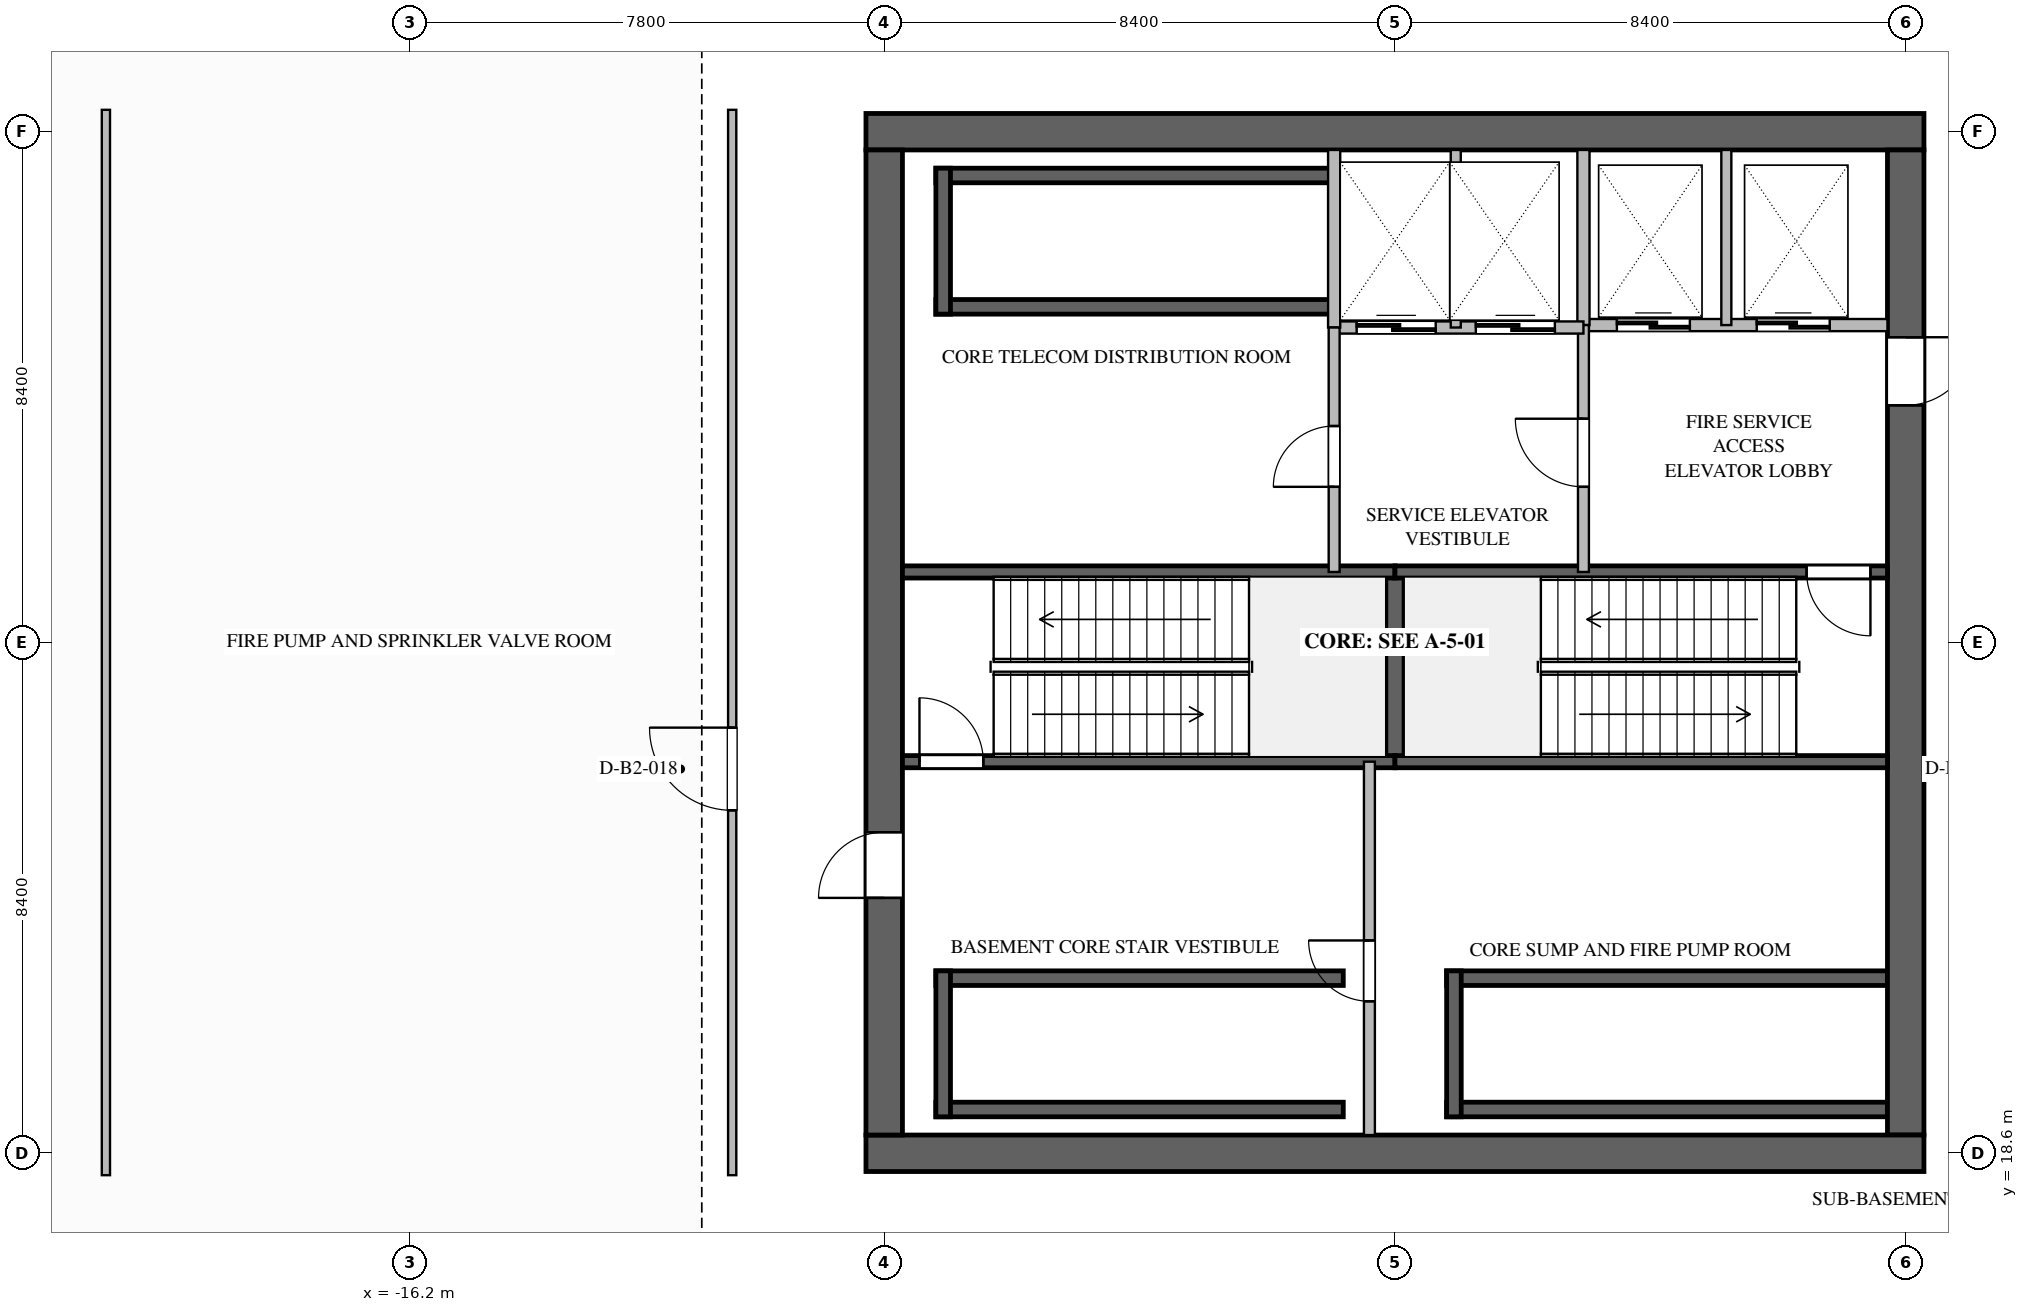
"""IFC4 building model, lengths in metres.
Left out: names, types, materials, properties, quantities, classifications, styles, units other than length and angle.
Written with IfcOpenShell. Run it as: python <this file> out.ifc"""

import sys

from ifc_helpers import new_model, si_unit, direction, frame, frame_2d, origin, place, context, subcontext, project, spatial, rectangle, extrude, element, fill, save


model = new_model("IFC4")
c1 = context("Model", 3, precision=1e-05, world=origin(), true_north=direction((0.0, 1.0)))
c2 = subcontext(c1, "Body", "Model", "MODEL_VIEW")
j1 = project(units=[si_unit("LENGTHUNIT", "METRE"), si_unit("PLANEANGLEUNIT", "RADIAN")], contexts=[c1])
p1 = place(None, origin())
s1 = spatial("IfcSite", under=j1, at=p1, CompositionType="ELEMENT")
p2 = place(p1, origin())
s2 = spatial("IfcBuilding", under=s1, at=p2, CompositionType="ELEMENT")
p3 = place(p2, frame((0.0, 0.0, -10.8)))
s3 = spatial("IfcBuildingStorey", under=s2, at=p3, CompositionType="ELEMENT", Elevation=-10.8)
for number, where, z_axis, x_axis in (
    (1, (-7.55, 19.32, 0.0), (0.0, 0.0, 1.0), (1.0, 0.0, 0.0)),
    (2, (-7.55, 21.48, 0.0), (0.0, 0.0, 1.0), (1.0, 0.0, 0.0)),
):
    element("IfcWall", number, at=place(p3, frame(where, z_axis=z_axis, x_axis=x_axis)), inside=s3, PredefinedType="USERDEFINED", context=c2, shape_type="SweptSolid", body=[
        extrude(rectangle(XDim=6.7, YDim=0.24, at=frame_2d((3.35, 0.0))), origin(), (0.0, 0.0, 1.0), 3.92),
    ])
p4 = place(p3, frame((-7.43, 19.2, 0.0), z_axis=(0.0, 0.0, 1.0), x_axis=(0.0, 1.0, 0.0)))
e3 = element("IfcWall", 3, at=p4, inside=s3, PredefinedType="USERDEFINED", context=c2, shape_type="SweptSolid", body=[
    extrude(rectangle(XDim=2.4, YDim=0.24, at=frame_2d((1.2, 0.0))), origin(), (0.0, 0.0, 1.0), 3.92),
])
for number, where, z_axis, x_axis in (
    (4, (0.85, 19.32, 0.0), (0.0, 0.0, 1.0), (1.0, 0.0, 0.0)),
    (5, (0.85, 21.48, 0.0), (0.0, 0.0, 1.0), (1.0, 0.0, 0.0)),
):
    element("IfcWall", number, at=place(p3, frame(where, z_axis=z_axis, x_axis=x_axis)), inside=s3, PredefinedType="USERDEFINED", context=c2, shape_type="SweptSolid", body=[
        extrude(rectangle(XDim=7.25, YDim=0.24, at=frame_2d((3.625, 0.0))), origin(), (0.0, 0.0, 1.0), 3.92),
    ])
p5 = place(p3, frame((0.97, 19.2, 0.0), z_axis=(0.0, 0.0, 1.0), x_axis=(0.0, 1.0, 0.0)))
e6 = element("IfcWall", 6, at=p5, inside=s3, PredefinedType="USERDEFINED", context=c2, shape_type="SweptSolid", body=[
    extrude(rectangle(XDim=2.4, YDim=0.24, at=frame_2d((1.2, 0.0))), origin(), (0.0, 0.0, 1.0), 3.92),
])
for number, where, z_axis, x_axis in (
    (7, (-7.55, 32.52, 0.0), (0.0, 0.0, 1.0), (1.0, 0.0, 0.0)),
    (8, (-7.55, 34.68, 0.0), (0.0, 0.0, 1.0), (1.0, 0.0, 0.0)),
):
    element("IfcWall", number, at=place(p3, frame(where, z_axis=z_axis, x_axis=x_axis)), inside=s3, PredefinedType="USERDEFINED", context=c2, shape_type="SweptSolid", body=[
        extrude(rectangle(XDim=6.5, YDim=0.24, at=frame_2d((3.25, 0.0))), origin(), (0.0, 0.0, 1.0), 3.92),
    ])
p6 = place(p3, frame((-7.43, 32.4, 0.0), z_axis=(0.0, 0.0, 1.0), x_axis=(0.0, 1.0, 0.0)))
e9 = element("IfcWall", 9, at=p6, inside=s3, PredefinedType="USERDEFINED", context=c2, shape_type="SweptSolid", body=[
    extrude(rectangle(XDim=2.4, YDim=0.24, at=frame_2d((1.2, 0.0))), origin(), (0.0, 0.0, 1.0), 3.92),
])
p7 = place(p3, frame((-8.7, 35.4, 0.0), z_axis=(0.0, 0.0, 1.0), x_axis=(1.0, 0.0, 0.0)))
e10 = element("IfcWall", 10, at=p7, inside=s3, PredefinedType="SHEAR", context=c2, shape_type="SweptSolid", body=[
    extrude(rectangle(XDim=17.4, YDim=0.6, at=frame_2d((8.7, 0.0))), origin(), (0.0, 0.0, 1.0), 5.4),
])
p8 = place(p3, frame((8.4, 35.1, 0.0), z_axis=(0.0, 0.0, 1.0), x_axis=(0.0, -1.0, 0.0)))
e11 = element("IfcWall", 11, at=p8, inside=s3, PredefinedType="SHEAR", context=c2, shape_type="SweptSolid", body=[
    extrude(rectangle(XDim=16.2, YDim=0.6, at=frame_2d((8.1, 0.0))), origin(), (0.0, 0.0, 1.0), 5.4),
])
p9 = place(p8, frame((3.08, 0.0, 0.0)))
e12 = element("IfcOpeningElement", 12, at=p9, cuts=e11, PredefinedType="OPENING", context=c2, shape_type="SweptSolid", body=[
    extrude(rectangle(XDim=1.12, YDim=2.1, at=frame_2d((0.56, 1.05))), frame((0.0, 0.31, 0.0), z_axis=(0.0, -1.0, 0.0), x_axis=(1.0, 0.0, 0.0)), (0.0, 0.0, 1.0), 0.62),
])
p10 = place(p3, frame((8.7, 18.6, 0.0), z_axis=(0.0, 0.0, 1.0), x_axis=(-1.0, 0.0, 0.0)))
e13 = element("IfcWall", 13, at=p10, inside=s3, PredefinedType="SHEAR", context=c2, shape_type="SweptSolid", body=[
    extrude(rectangle(XDim=17.4, YDim=0.6, at=frame_2d((8.7, 0.0))), origin(), (0.0, 0.0, 1.0), 5.4),
])
p11 = place(p3, frame((-8.4, 18.9, 0.0), z_axis=(0.0, 0.0, 1.0), x_axis=(0.0, 1.0, 0.0)))
e14 = element("IfcWall", 14, at=p11, inside=s3, PredefinedType="SHEAR", context=c2, shape_type="SweptSolid", body=[
    extrude(rectangle(XDim=16.2, YDim=0.6, at=frame_2d((8.1, 0.0))), origin(), (0.0, 0.0, 1.0), 5.4),
])
p12 = place(p11, frame((3.9, 0.0, 0.0)))
e15 = element("IfcOpeningElement", 15, at=p12, cuts=e14, PredefinedType="OPENING", context=c2, shape_type="SweptSolid", body=[
    extrude(rectangle(XDim=1.08, YDim=2.04, at=frame_2d((0.54, 1.02))), frame((0.0, 0.31, 0.0), z_axis=(0.0, -1.0, 0.0), x_axis=(1.0, 0.0, 0.0)), (0.0, 0.0, 1.0), 0.62),
])
p13 = place(p3, frame((0.0, 25.04, 0.0), z_axis=(0.0, 0.0, 1.0), x_axis=(0.0, 1.0, 0.0)))
e16 = element("IfcWall", 16, at=p13, inside=s3, PredefinedType="SOLIDWALL", context=c2, shape_type="SweptSolid", body=[
    extrude(rectangle(XDim=3.12, YDim=0.3, at=frame_2d((1.56, 0.0))), origin(), (0.0, 0.0, 1.0), 5.05),
])
p14 = place(p3, frame((-8.1, 25.04, 0.0), z_axis=(0.0, 0.0, 1.0), x_axis=(1.0, 0.0, 0.0)))
e17 = element("IfcWall", 17, at=p14, inside=s3, PredefinedType="SOLIDWALL", context=c2, shape_type="SweptSolid", body=[
    extrude(rectangle(XDim=8.1, YDim=0.2, at=frame_2d((4.05, 0.0))), origin(), (0.0, 0.0, 1.0), 5.05),
])
p15 = place(p14, frame((0.28, 0.0, 0.0)))
e18 = element("IfcOpeningElement", 18, at=p15, cuts=e17, PredefinedType="OPENING", context=c2, shape_type="SweptSolid", body=[
    extrude(rectangle(XDim=1.05, YDim=2.1, at=frame_2d((0.525, 1.05))), frame((0.0, 0.11, 0.0), z_axis=(0.0, -1.0, 0.0), x_axis=(1.0, 0.0, 0.0)), (0.0, 0.0, 1.0), 0.22),
])
for number, where, z_axis, x_axis in (
    (19, (-8.1, 28.16, 0.0), (0.0, 0.0, 1.0), (1.0, 0.0, 0.0)),
    (20, (0.0, 25.04, 0.0), (0.0, 0.0, 1.0), (1.0, 0.0, 0.0)),
):
    element("IfcWall", number, at=place(p3, frame(where, z_axis=z_axis, x_axis=x_axis)), inside=s3, PredefinedType="SOLIDWALL", context=c2, shape_type="SweptSolid", body=[
        extrude(rectangle(XDim=8.1, YDim=0.2, at=frame_2d((4.05, 0.0))), origin(), (0.0, 0.0, 1.0), 5.05),
    ])
p16 = place(p3, frame((8.1, 28.16, 0.0), z_axis=(0.0, 0.0, 1.0), x_axis=(-1.0, 0.0, 0.0)))
e21 = element("IfcWall", 21, at=p16, inside=s3, PredefinedType="SOLIDWALL", context=c2, shape_type="SweptSolid", body=[
    extrude(rectangle(XDim=8.1, YDim=0.2, at=frame_2d((4.05, 0.0))), origin(), (0.0, 0.0, 1.0), 5.05),
])
p17 = place(p16, frame((0.28, 0.0, 0.0)))
e22 = element("IfcOpeningElement", 22, at=p17, cuts=e21, PredefinedType="OPENING", context=c2, shape_type="SweptSolid", body=[
    extrude(rectangle(XDim=1.05, YDim=2.1, at=frame_2d((0.525, 1.05))), frame((0.0, 0.11, 0.0), z_axis=(0.0, -1.0, 0.0), x_axis=(1.0, 0.0, 0.0)), (0.0, 0.0, 1.0), 0.22),
])
p18 = place(p3, frame((3.1, 32.22, 0.0), z_axis=(0.0, 0.0, 1.0), x_axis=(1.0, 0.0, 0.0)))
e23 = element("IfcWall", 23, at=p18, inside=s3, PredefinedType="SOLIDWALL", context=c2, shape_type="SweptSolid", body=[
    extrude(rectangle(XDim=5.0, YDim=0.2, at=frame_2d((2.5, 0.0))), origin(), (0.0, 0.0, 1.0), 5.05),
])
p19 = place(p18, frame((0.55, 0.0, 0.0)))
e24 = element("IfcOpeningElement", 24, at=p19, cuts=e23, PredefinedType="OPENING", context=c2, shape_type="SweptSolid", body=[
    extrude(rectangle(XDim=1.2, YDim=2.2, at=frame_2d((0.6, 1.1))), frame((0.0, 0.11, 0.0), z_axis=(0.0, -1.0, 0.0), x_axis=(1.0, 0.0, 0.0)), (0.0, 0.0, 1.0), 0.22),
])
p20 = place(p18, frame((2.85, 0.0, 0.0)))
e25 = element("IfcOpeningElement", 25, at=p20, cuts=e23, PredefinedType="OPENING", context=c2, shape_type="SweptSolid", body=[
    extrude(rectangle(XDim=1.2, YDim=2.2, at=frame_2d((0.6, 1.1))), frame((0.0, 0.11, 0.0), z_axis=(0.0, -1.0, 0.0), x_axis=(1.0, 0.0, 0.0)), (0.0, 0.0, 1.0), 0.22),
])
p21 = place(p3, frame((3.1, 32.22, 0.0), z_axis=(0.0, 0.0, 1.0), x_axis=(0.0, 1.0, 0.0)))
e26 = element("IfcWall", 26, at=p21, inside=s3, PredefinedType="SOLIDWALL", context=c2, shape_type="SweptSolid", body=[
    extrude(rectangle(XDim=2.88, YDim=0.2, at=frame_2d((1.44, 0.0))), origin(), (0.0, 0.0, 1.0), 5.05),
])
p22 = place(p3, frame((5.45, 32.22, 0.0), z_axis=(0.0, 0.0, 1.0), x_axis=(0.0, 1.0, 0.0)))
e27 = element("IfcWall", 27, at=p22, inside=s3, PredefinedType="PARTITIONING", context=c2, shape_type="SweptSolid", body=[
    extrude(rectangle(XDim=2.88, YDim=0.165, at=frame_2d((1.44, 0.0))), origin(), (0.0, 0.0, 1.0), 5.05),
])
p23 = place(p3, frame((3.1, 28.16, 0.0), z_axis=(0.0, 0.0, 1.0), x_axis=(0.0, 1.0, 0.0)))
e28 = element("IfcWall", 28, at=p23, inside=s3, PredefinedType="SOLIDWALL", context=c2, shape_type="SweptSolid", body=[
    extrude(rectangle(XDim=4.06, YDim=0.18, at=frame_2d((2.03, 0.0))), origin(), (0.0, 0.0, 1.0), 5.05),
])
p24 = place(p23, frame((1.4, 0.0, 0.0)))
e29 = element("IfcOpeningElement", 29, at=p24, cuts=e28, PredefinedType="OPENING", context=c2, shape_type="SweptSolid", body=[
    extrude(rectangle(XDim=1.12, YDim=2.1, at=frame_2d((0.56, 1.05))), frame((0.0, 0.1, 0.0), z_axis=(0.0, -1.0, 0.0), x_axis=(1.0, 0.0, 0.0)), (0.0, 0.0, 1.0), 0.2),
])
p25 = place(p3, frame((-1.0, 32.18, 0.0), z_axis=(0.0, 0.0, 1.0), x_axis=(1.0, 0.0, 0.0)))
e30 = element("IfcWall", 30, at=p25, inside=s3, PredefinedType="SOLIDWALL", context=c2, shape_type="SweptSolid", body=[
    extrude(rectangle(XDim=4.1, YDim=0.2, at=frame_2d((2.05, 0.0))), origin(), (0.0, 0.0, 1.0), 5.05),
])
p26 = place(p25, frame((0.37, 0.0, 0.0)))
e31 = element("IfcOpeningElement", 31, at=p26, cuts=e30, PredefinedType="OPENING", context=c2, shape_type="SweptSolid", body=[
    extrude(rectangle(XDim=1.3, YDim=2.2, at=frame_2d((0.65, 1.1))), frame((0.0, 0.11, 0.0), z_axis=(0.0, -1.0, 0.0), x_axis=(1.0, 0.0, 0.0)), (0.0, 0.0, 1.0), 0.22),
])
p27 = place(p25, frame((2.33, 0.0, 0.0)))
e32 = element("IfcOpeningElement", 32, at=p27, cuts=e30, PredefinedType="OPENING", context=c2, shape_type="SweptSolid", body=[
    extrude(rectangle(XDim=1.3, YDim=2.2, at=frame_2d((0.65, 1.1))), frame((0.0, 0.11, 0.0), z_axis=(0.0, -1.0, 0.0), x_axis=(1.0, 0.0, 0.0)), (0.0, 0.0, 1.0), 0.22),
])
p28 = place(p3, frame((-1.0, 32.18, 0.0), z_axis=(0.0, 0.0, 1.0), x_axis=(0.0, 1.0, 0.0)))
e33 = element("IfcWall", 33, at=p28, inside=s3, PredefinedType="SOLIDWALL", context=c2, shape_type="SweptSolid", body=[
    extrude(rectangle(XDim=2.92, YDim=0.2, at=frame_2d((1.46, 0.0))), origin(), (0.0, 0.0, 1.0), 5.05),
])
p29 = place(p3, frame((1.0, 32.18, 0.0), z_axis=(0.0, 0.0, 1.0), x_axis=(0.0, 1.0, 0.0)))
e34 = element("IfcWall", 34, at=p29, inside=s3, PredefinedType="PARTITIONING", context=c2, shape_type="SweptSolid", body=[
    extrude(rectangle(XDim=2.92, YDim=0.165, at=frame_2d((1.46, 0.0))), origin(), (0.0, 0.0, 1.0), 5.05),
])
p30 = place(p3, frame((-1.0, 28.16, 0.0), z_axis=(0.0, 0.0, 1.0), x_axis=(0.0, 1.0, 0.0)))
e35 = element("IfcWall", 35, at=p30, inside=s3, PredefinedType="SOLIDWALL", context=c2, shape_type="SweptSolid", body=[
    extrude(rectangle(XDim=4.02, YDim=0.18, at=frame_2d((2.01, 0.0))), origin(), (0.0, 0.0, 1.0), 5.05),
])
p31 = place(p30, frame((1.4, 0.0, 0.0)))
e36 = element("IfcOpeningElement", 36, at=p31, cuts=e35, PredefinedType="OPENING", context=c2, shape_type="SweptSolid", body=[
    extrude(rectangle(XDim=1.0, YDim=2.1, at=frame_2d((0.5, 1.05))), frame((0.0, 0.1, 0.0), z_axis=(0.0, -1.0, 0.0), x_axis=(1.0, 0.0, 0.0)), (0.0, 0.0, 1.0), 0.2),
])
p32 = place(p3, frame((-0.42, 18.9, 0.0), z_axis=(0.0, 0.0, 1.0), x_axis=(0.0, 1.0, 0.0)))
e37 = element("IfcWall", 37, at=p32, inside=s3, PredefinedType="SOLIDWALL", context=c2, shape_type="SweptSolid", body=[
    extrude(rectangle(XDim=6.14, YDim=0.18, at=frame_2d((3.07, 0.0))), origin(), (0.0, 0.0, 1.0), 5.05),
])
p33 = place(p32, frame((2.2, 0.0, 0.0)))
e38 = element("IfcOpeningElement", 38, at=p33, cuts=e37, PredefinedType="OPENING", context=c2, shape_type="SweptSolid", body=[
    extrude(rectangle(XDim=1.0, YDim=2.1, at=frame_2d((0.5, 1.05))), frame((0.0, 0.1, 0.0), z_axis=(0.0, -1.0, 0.0), x_axis=(1.0, 0.0, 0.0)), (0.0, 0.0, 1.0), 0.2),
])
p34 = place(p3, frame((-10.9, 18.24, 0.0), z_axis=(0.0, 0.0, 1.0), x_axis=(0.0, 1.0, 0.0)))
e39 = element("IfcWall", 39, at=p34, inside=s3, PredefinedType="PARTITIONING", context=c2, shape_type="SweptSolid", body=[
    extrude(rectangle(XDim=17.52, YDim=0.135, at=frame_2d((8.76, 0.0))), origin(), (0.0, 0.0, 1.0), 5.05),
])
p35 = place(p34, frame((6.0, 0.0, 0.0)))
e40 = element("IfcOpeningElement", 40, at=p35, cuts=e39, PredefinedType="OPENING", context=c2, shape_type="SweptSolid", body=[
    extrude(rectangle(XDim=1.36, YDim=2.2, at=frame_2d((0.68, 1.1))), frame((0.0, 0.077, 0.0), z_axis=(0.0, -1.0, 0.0), x_axis=(1.0, 0.0, 0.0)), (0.0, 0.0, 1.0), 0.155),
])
p36 = place(p3, frame((-21.2, 18.24, 0.0), z_axis=(0.0, 0.0, 1.0), x_axis=(0.0, 1.0, 0.0)))
e41 = element("IfcWall", 41, at=p36, inside=s3, PredefinedType="PARTITIONING", context=c2, shape_type="SweptSolid", body=[
    extrude(rectangle(XDim=17.52, YDim=0.135, at=frame_2d((8.76, 0.0))), origin(), (0.0, 0.0, 1.0), 5.05),
])
p37 = place(p15, origin())
e42 = element("IfcDoor", 42, at=p37, inside=s3, OperationType="SINGLE_SWING_LEFT", PredefinedType="DOOR", context=c2, shape_type="SweptSolid", body=[
    extrude(rectangle(XDim=1.05, YDim=2.1, at=frame_2d((0.525, 1.05))), frame((0.0, 0.025, 0.0), z_axis=(0.0, -1.0, 0.0), x_axis=(1.0, 0.0, 0.0)), (0.0, 0.0, 1.0), 0.05),
])
fill(e18, e42)
p38 = place(p17, origin())
e43 = element("IfcDoor", 43, at=p38, inside=s3, OperationType="SINGLE_SWING_LEFT", PredefinedType="DOOR", context=c2, shape_type="SweptSolid", body=[
    extrude(rectangle(XDim=1.05, YDim=2.1, at=frame_2d((0.525, 1.05))), frame((0.0, 0.025, 0.0), z_axis=(0.0, -1.0, 0.0), x_axis=(1.0, 0.0, 0.0)), (0.0, 0.0, 1.0), 0.05),
])
fill(e22, e43)
p39 = place(p19, origin())
e44 = element("IfcDoor", 44, at=p39, inside=s3, OperationType="SLIDING_TO_LEFT", PredefinedType="DOOR", context=c2, shape_type="SweptSolid", body=[
    extrude(rectangle(XDim=1.2, YDim=2.2, at=frame_2d((0.6, 1.1))), frame((0.0, 0.025, 0.0), z_axis=(0.0, -1.0, 0.0), x_axis=(1.0, 0.0, 0.0)), (0.0, 0.0, 1.0), 0.05),
])
fill(e24, e44)
p40 = place(p20, origin())
e45 = element("IfcDoor", 45, at=p40, inside=s3, OperationType="SLIDING_TO_LEFT", PredefinedType="DOOR", context=c2, shape_type="SweptSolid", body=[
    extrude(rectangle(XDim=1.2, YDim=2.2, at=frame_2d((0.6, 1.1))), frame((0.0, 0.025, 0.0), z_axis=(0.0, -1.0, 0.0), x_axis=(1.0, 0.0, 0.0)), (0.0, 0.0, 1.0), 0.05),
])
fill(e25, e45)
p41 = place(p24, origin())
e46 = element("IfcDoor", 46, at=p41, inside=s3, OperationType="SINGLE_SWING_RIGHT", PredefinedType="DOOR", context=c2, shape_type="SweptSolid", body=[
    extrude(rectangle(XDim=1.12, YDim=2.1, at=frame_2d((0.56, 1.05))), frame((0.0, 0.025, 0.0), z_axis=(0.0, -1.0, 0.0), x_axis=(1.0, 0.0, 0.0)), (0.0, 0.0, 1.0), 0.05),
])
fill(e29, e46)
p42 = place(p9, origin())
e47 = element("IfcDoor", 47, at=p42, inside=s3, OperationType="SINGLE_SWING_LEFT", PredefinedType="DOOR", context=c2, shape_type="SweptSolid", body=[
    extrude(rectangle(XDim=1.12, YDim=2.1, at=frame_2d((0.56, 1.05))), frame((0.0, 0.025, 0.0), z_axis=(0.0, -1.0, 0.0), x_axis=(1.0, 0.0, 0.0)), (0.0, 0.0, 1.0), 0.05),
])
fill(e12, e47)
p43 = place(p26, origin())
e48 = element("IfcDoor", 48, at=p43, inside=s3, OperationType="SLIDING_TO_LEFT", PredefinedType="DOOR", context=c2, shape_type="SweptSolid", body=[
    extrude(rectangle(XDim=1.3, YDim=2.2, at=frame_2d((0.65, 1.1))), frame((0.0, 0.025, 0.0), z_axis=(0.0, -1.0, 0.0), x_axis=(1.0, 0.0, 0.0)), (0.0, 0.0, 1.0), 0.05),
])
fill(e31, e48)
p44 = place(p27, origin())
e49 = element("IfcDoor", 49, at=p44, inside=s3, OperationType="SLIDING_TO_LEFT", PredefinedType="DOOR", context=c2, shape_type="SweptSolid", body=[
    extrude(rectangle(XDim=1.3, YDim=2.2, at=frame_2d((0.65, 1.1))), frame((0.0, 0.025, 0.0), z_axis=(0.0, -1.0, 0.0), x_axis=(1.0, 0.0, 0.0)), (0.0, 0.0, 1.0), 0.05),
])
fill(e32, e49)
p45 = place(p31, origin())
e50 = element("IfcDoor", 50, at=p45, inside=s3, OperationType="SINGLE_SWING_LEFT", PredefinedType="DOOR", context=c2, shape_type="SweptSolid", body=[
    extrude(rectangle(XDim=1.0, YDim=2.1, at=frame_2d((0.5, 1.05))), frame((0.0, 0.025, 0.0), z_axis=(0.0, -1.0, 0.0), x_axis=(1.0, 0.0, 0.0)), (0.0, 0.0, 1.0), 0.05),
])
fill(e36, e50)
p46 = place(p33, origin())
e51 = element("IfcDoor", 51, at=p46, inside=s3, OperationType="SINGLE_SWING_RIGHT", PredefinedType="DOOR", context=c2, shape_type="SweptSolid", body=[
    extrude(rectangle(XDim=1.0, YDim=2.1, at=frame_2d((0.5, 1.05))), frame((0.0, 0.025, 0.0), z_axis=(0.0, -1.0, 0.0), x_axis=(1.0, 0.0, 0.0)), (0.0, 0.0, 1.0), 0.05),
])
fill(e38, e51)
p47 = place(p12, origin())
e52 = element("IfcDoor", 52, at=p47, inside=s3, OperationType="SINGLE_SWING_LEFT", PredefinedType="DOOR", context=c2, shape_type="SweptSolid", body=[
    extrude(rectangle(XDim=1.08, YDim=2.04, at=frame_2d((0.54, 1.02))), frame((0.0, 0.025, 0.0), z_axis=(0.0, -1.0, 0.0), x_axis=(1.0, 0.0, 0.0)), (0.0, 0.0, 1.0), 0.05),
])
fill(e15, e52)
p48 = place(p35, origin())
e53 = element("IfcDoor", 53, at=p48, inside=s3, OperationType="SINGLE_SWING_RIGHT", PredefinedType="DOOR", context=c2, shape_type="SweptSolid", body=[
    extrude(rectangle(XDim=1.36, YDim=2.2, at=frame_2d((0.68, 1.1))), frame((0.0, 0.025, 0.0), z_axis=(0.0, -1.0, 0.0), x_axis=(1.0, 0.0, 0.0)), (0.0, 0.0, 1.0), 0.05),
])
fill(e40, e53)
save(model, sys.argv[1])
